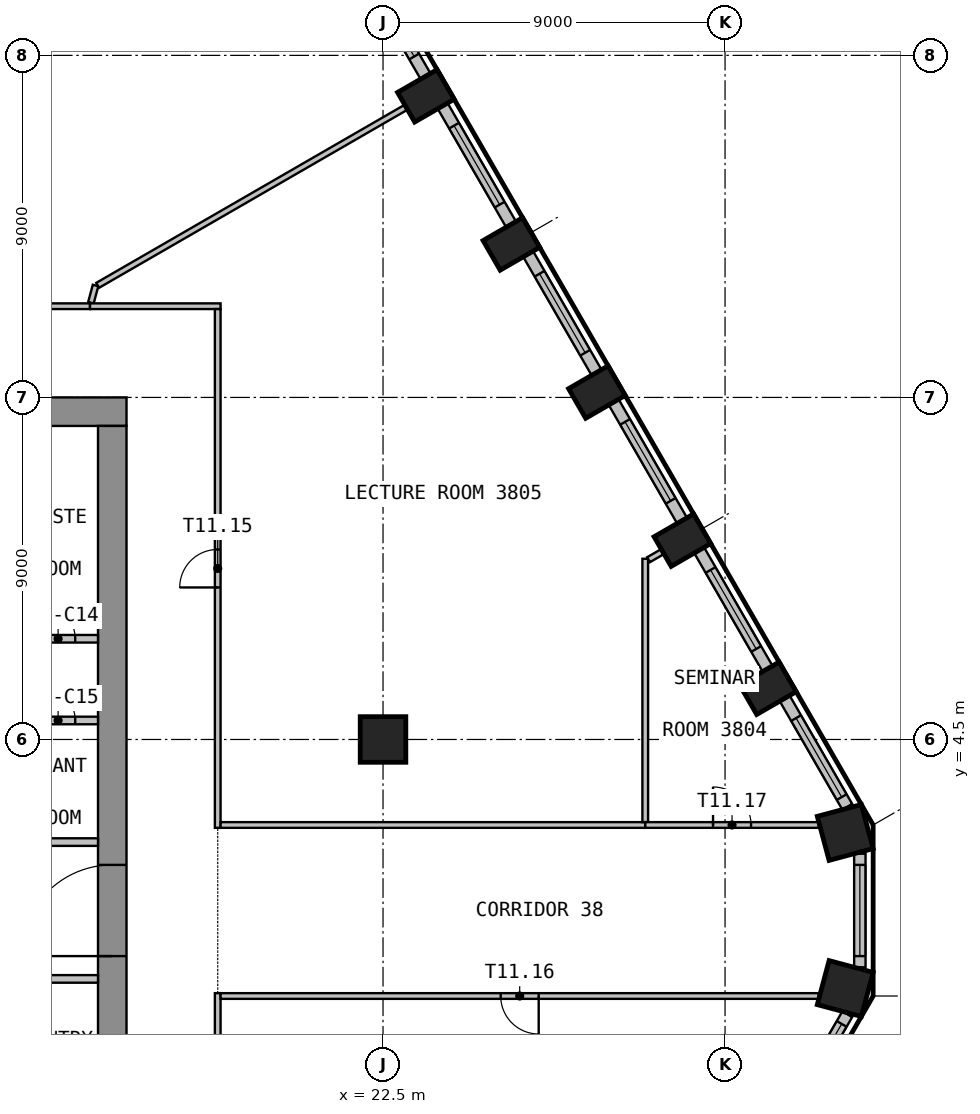
"""IFC4 building model, lengths in metres.
Left out: names, types, materials, properties, quantities, classifications, styles, units other than length and angle.
Written with IfcOpenShell. Run it as: python <this file> out.ifc"""

import sys

from ifc_helpers import new_model, si_unit, direction, frame, frame_2d, origin, origin_2d, place, context, subcontext, project, spatial, rectangle, circle, extrude, element, fill, save


model = new_model("IFC4")
c1 = context("Model", 3, precision=1e-05, world=origin(), true_north=direction((0.0, 1.0)))
c2 = subcontext(c1, "Body", "Model", "MODEL_VIEW")
j1 = project(units=[si_unit("LENGTHUNIT", "METRE"), si_unit("PLANEANGLEUNIT", "RADIAN")], contexts=[c1])
p1 = place(None, origin())
s1 = spatial("IfcSite", under=j1, at=p1, CompositionType="ELEMENT")
p2 = place(p1, origin())
s2 = spatial("IfcBuilding", under=s1, at=p2, CompositionType="ELEMENT")
p3 = place(p2, frame((0.0, 0.0, 156.0)))
s3 = spatial("IfcBuildingStorey", under=s2, at=p3, CompositionType="ELEMENT", Elevation=156.0)
for number, where, z_axis, x_axis in (
    (1, (34.662, -2.053, 0.0), (0.0, 0.0, 1.0), (0.259, 0.966, 0.0)),
    (2, (34.662, 2.053, 0.0), (0.0, 0.0, 1.0), (-0.259, 0.966, 0.0)),
):
    element("IfcColumn", number, at=place(p3, frame(where, z_axis=z_axis, x_axis=x_axis)), inside=s3, PredefinedType="COLUMN", context=c2, shape_type="SweptSolid", body=[
        extrude(rectangle(XDim=1.2, YDim=1.2, at=origin_2d()), origin(), (0.0, 0.0, 1.0), 3.575),
    ])
for number, where, z_axis, x_axis in (
    (3, (32.627, 5.847, 0.0), (0.0, 0.0, 1.0), (-0.5, 0.866, 0.0)),
    (4, (30.377, 9.744, 0.0), (0.0, 0.0, 1.0), (-0.5, 0.866, 0.0)),
    (5, (28.127, 13.641, 0.0), (0.0, 0.0, 1.0), (-0.5, 0.866, 0.0)),
    (6, (25.877, 17.539, 0.0), (0.0, 0.0, 1.0), (-0.5, 0.866, 0.0)),
    (7, (23.627, 21.436, 0.0), (0.0, 0.0, 1.0), (-0.5, 0.866, 0.0)),
):
    element("IfcColumn", number, at=place(p3, frame(where, z_axis=z_axis, x_axis=x_axis)), inside=s3, PredefinedType="COLUMN", context=c2, shape_type="SweptSolid", body=[
        extrude(rectangle(XDim=0.9, YDim=1.2, at=origin_2d()), origin(), (0.0, 0.0, 1.0), 3.575),
    ])
p4 = place(p3, frame((22.5, 4.5, 0.0), z_axis=(0.0, 0.0, 1.0), x_axis=(1.0, 0.0, 0.0)))
e8 = element("IfcColumn", 8, at=p4, inside=s3, PredefinedType="COLUMN", context=c2, shape_type="SweptSolid", body=[
    extrude(circle(Radius=0.6, at=origin_2d()), origin(), (0.0, 0.0, 1.0), 3.575),
])
p5 = place(p3, frame((33.069, -5.582, 0.0), z_axis=(0.0, 0.0, 1.0), x_axis=(0.499981217486, 0.866036247602, 0.0)))
e9 = element("IfcWall", 9, at=p5, inside=s3, PredefinedType="SOLIDWALL", context=c2, shape_type="SweptSolid", body=[
    extrude(rectangle(XDim=3.294, YDim=0.3, at=frame_2d((1.647, 0.0))), origin(), (0.0, 0.0, 1.0), 3.575),
])
p6 = place(p5, frame((0.6, 0.0, 0.9)))
e10 = element("IfcOpeningElement", 10, at=p6, cuts=e9, PredefinedType="OPENING", context=c2, shape_type="SweptSolid", body=[
    extrude(rectangle(XDim=2.4, YDim=2.1, at=frame_2d((1.2, 1.05))), frame((0.0, 0.16, 0.0), z_axis=(0.0, -1.0, 0.0), x_axis=(1.0, 0.0, 0.0)), (0.0, 0.0, 1.0), 0.32),
])
p7 = place(p3, frame((35.047, -1.495, 0.0), z_axis=(0.0, 0.0, 1.0), x_axis=(0.0, 1.0, 0.0)))
e11 = element("IfcWall", 11, at=p7, inside=s3, PredefinedType="SOLIDWALL", context=c2, shape_type="SweptSolid", body=[
    extrude(rectangle(XDim=2.989, YDim=0.3, at=frame_2d((1.495, 0.0))), origin(), (0.0, 0.0, 1.0), 3.575),
])
p8 = place(p7, frame((0.295, 0.0, 0.9)))
e12 = element("IfcOpeningElement", 12, at=p8, cuts=e11, PredefinedType="OPENING", context=c2, shape_type="SweptSolid", body=[
    extrude(rectangle(XDim=2.4, YDim=2.1, at=frame_2d((1.2, 1.05))), frame((0.0, 0.16, 0.0), z_axis=(0.0, -1.0, 0.0), x_axis=(1.0, 0.0, 0.0)), (0.0, 0.0, 1.0), 0.32),
])
p9 = place(p3, frame((34.716, 2.729, 0.0), z_axis=(0.0, 0.0, 1.0), x_axis=(-0.499981217486, 0.866036247602, 0.0)))
e13 = element("IfcWall", 13, at=p9, inside=s3, PredefinedType="SOLIDWALL", context=c2, shape_type="SweptSolid", body=[
    extrude(rectangle(XDim=3.294, YDim=0.3, at=frame_2d((1.647, 0.0))), origin(), (0.0, 0.0, 1.0), 3.575),
])
p10 = place(p9, frame((0.295, 0.0, 0.9)))
e14 = element("IfcOpeningElement", 14, at=p10, cuts=e13, PredefinedType="OPENING", context=c2, shape_type="SweptSolid", body=[
    extrude(rectangle(XDim=2.4, YDim=2.1, at=frame_2d((1.2, 1.05))), frame((0.0, 0.16, 0.0), z_axis=(0.0, -1.0, 0.0), x_axis=(1.0, 0.0, 0.0)), (0.0, 0.0, 1.0), 0.32),
])
p11 = place(p3, frame((32.619, 6.362, 0.0), z_axis=(0.0, 0.0, 1.0), x_axis=(-0.500027802648, 0.866009351323, 0.0)))
e15 = element("IfcWall", 15, at=p11, inside=s3, PredefinedType="SOLIDWALL", context=c2, shape_type="SweptSolid", body=[
    extrude(rectangle(XDim=3.599, YDim=0.3, at=frame_2d((1.799, 0.0))), origin(), (0.0, 0.0, 1.0), 3.575),
])
p12 = place(p11, frame((0.6, 0.0, 0.9)))
e16 = element("IfcOpeningElement", 16, at=p12, cuts=e15, PredefinedType="OPENING", context=c2, shape_type="SweptSolid", body=[
    extrude(rectangle(XDim=2.4, YDim=2.1, at=frame_2d((1.2, 1.05))), frame((0.0, 0.16, 0.0), z_axis=(0.0, -1.0, 0.0), x_axis=(1.0, 0.0, 0.0)), (0.0, 0.0, 1.0), 0.32),
])
p13 = place(p3, frame((30.369, 10.26, 0.0), z_axis=(0.0, 0.0, 1.0), x_axis=(-0.500027802648, 0.866009351323, 0.0)))
e17 = element("IfcWall", 17, at=p13, inside=s3, PredefinedType="SOLIDWALL", context=c2, shape_type="SweptSolid", body=[
    extrude(rectangle(XDim=3.599, YDim=0.3, at=frame_2d((1.799, 0.0))), origin(), (0.0, 0.0, 1.0), 3.575),
])
p14 = place(p13, frame((0.6, 0.0, 0.9)))
e18 = element("IfcOpeningElement", 18, at=p14, cuts=e17, PredefinedType="OPENING", context=c2, shape_type="SweptSolid", body=[
    extrude(rectangle(XDim=2.4, YDim=2.1, at=frame_2d((1.2, 1.05))), frame((0.0, 0.16, 0.0), z_axis=(0.0, -1.0, 0.0), x_axis=(1.0, 0.0, 0.0)), (0.0, 0.0, 1.0), 0.32),
])
p15 = place(p3, frame((28.119, 14.156, 0.0), z_axis=(0.0, 0.0, 1.0), x_axis=(-0.500027802648, 0.866009351323, 0.0)))
e19 = element("IfcWall", 19, at=p15, inside=s3, PredefinedType="SOLIDWALL", context=c2, shape_type="SweptSolid", body=[
    extrude(rectangle(XDim=3.599, YDim=0.3, at=frame_2d((1.799, 0.0))), origin(), (0.0, 0.0, 1.0), 3.575),
])
p16 = place(p15, frame((0.6, 0.0, 0.9)))
e20 = element("IfcOpeningElement", 20, at=p16, cuts=e19, PredefinedType="OPENING", context=c2, shape_type="SweptSolid", body=[
    extrude(rectangle(XDim=2.4, YDim=2.1, at=frame_2d((1.2, 1.05))), frame((0.0, 0.16, 0.0), z_axis=(0.0, -1.0, 0.0), x_axis=(1.0, 0.0, 0.0)), (0.0, 0.0, 1.0), 0.32),
])
p17 = place(p3, frame((25.869, 18.054, 0.0), z_axis=(0.0, 0.0, 1.0), x_axis=(-0.500027802648, 0.866009351323, 0.0)))
e21 = element("IfcWall", 21, at=p17, inside=s3, PredefinedType="SOLIDWALL", context=c2, shape_type="SweptSolid", body=[
    extrude(rectangle(XDim=3.599, YDim=0.3, at=frame_2d((1.799, 0.0))), origin(), (0.0, 0.0, 1.0), 3.575),
])
p18 = place(p17, frame((0.6, 0.0, 0.9)))
e22 = element("IfcOpeningElement", 22, at=p18, cuts=e21, PredefinedType="OPENING", context=c2, shape_type="SweptSolid", body=[
    extrude(rectangle(XDim=2.4, YDim=2.1, at=frame_2d((1.2, 1.05))), frame((0.0, 0.16, 0.0), z_axis=(0.0, -1.0, 0.0), x_axis=(1.0, 0.0, 0.0)), (0.0, 0.0, 1.0), 0.32),
])
p19 = place(p3, frame((23.619, 21.951, 0.0), z_axis=(0.0, 0.0, 1.0), x_axis=(-0.500036802197, 0.866004154983, 0.0)))
e23 = element("IfcWall", 23, at=p19, inside=s3, PredefinedType="SOLIDWALL", context=c2, shape_type="SweptSolid", body=[
    extrude(rectangle(XDim=3.294, YDim=0.3, at=frame_2d((1.647, 0.0))), origin(), (0.0, 0.0, 1.0), 3.575),
])
p20 = place(p19, frame((0.6, 0.0, 0.9)))
e24 = element("IfcOpeningElement", 24, at=p20, cuts=e23, PredefinedType="OPENING", context=c2, shape_type="SweptSolid", body=[
    extrude(rectangle(XDim=2.4, YDim=2.1, at=frame_2d((1.2, 1.05))), frame((0.0, 0.16, 0.0), z_axis=(0.0, -1.0, 0.0), x_axis=(1.0, 0.0, 0.0)), (0.0, 0.0, 1.0), 0.32),
])
p21 = place(p3, frame((-15.75, 13.125, 0.0), z_axis=(0.0, 0.0, 1.0), x_axis=(1.0, 0.0, 0.0)))
e25 = element("IfcWall", 25, at=p21, inside=s3, PredefinedType="SHEAR", context=c2, shape_type="SweptSolid", body=[
    extrude(rectangle(XDim=31.5, YDim=0.75, at=frame_2d((15.75, 0.0))), origin(), (0.0, 0.0, 1.0), 3.575),
])
p22 = place(p21, frame((14.55, 0.0, 0.0)))
e26 = element("IfcOpeningElement", 26, at=p22, cuts=e25, PredefinedType="OPENING", context=c2, shape_type="SweptSolid", body=[
    extrude(rectangle(XDim=2.4, YDim=2.1, at=frame_2d((1.2, 1.05))), frame((0.0, 0.385, 0.0), z_axis=(0.0, -1.0, 0.0), x_axis=(1.0, 0.0, 0.0)), (0.0, 0.0, 1.0), 0.77),
])
p23 = place(p21, frame((3.3, 0.0, 0.0)))
e27 = element("IfcOpeningElement", 27, at=p23, cuts=e25, PredefinedType="OPENING", context=c2, shape_type="SweptSolid", body=[
    extrude(rectangle(XDim=1.2, YDim=2.1, at=frame_2d((0.6, 1.05))), frame((0.0, 0.385, 0.0), z_axis=(0.0, -1.0, 0.0), x_axis=(1.0, 0.0, 0.0)), (0.0, 0.0, 1.0), 0.77),
])
p24 = place(p21, frame((27.0, 0.0, 0.0)))
e28 = element("IfcOpeningElement", 28, at=p24, cuts=e25, PredefinedType="OPENING", context=c2, shape_type="SweptSolid", body=[
    extrude(rectangle(XDim=1.2, YDim=2.1, at=frame_2d((0.6, 1.05))), frame((0.0, 0.385, 0.0), z_axis=(0.0, -1.0, 0.0), x_axis=(1.0, 0.0, 0.0)), (0.0, 0.0, 1.0), 0.77),
])
p25 = place(p3, frame((15.375, -12.75, 0.0), z_axis=(0.0, 0.0, 1.0), x_axis=(0.0, 1.0, 0.0)))
e29 = element("IfcWall", 29, at=p25, inside=s3, PredefinedType="SHEAR", context=c2, shape_type="SweptSolid", body=[
    extrude(rectangle(XDim=25.5, YDim=0.75, at=frame_2d((12.75, 0.0))), origin(), (0.0, 0.0, 1.0), 3.575),
])
p26 = place(p25, frame((11.55, 0.0, 0.0)))
e30 = element("IfcOpeningElement", 30, at=p26, cuts=e29, PredefinedType="OPENING", context=c2, shape_type="SweptSolid", body=[
    extrude(rectangle(XDim=2.4, YDim=2.1, at=frame_2d((1.2, 1.05))), frame((0.0, 0.385, 0.0), z_axis=(0.0, -1.0, 0.0), x_axis=(1.0, 0.0, 0.0)), (0.0, 0.0, 1.0), 0.77),
])
p27 = place(p3, frame((12.9, 7.15, 0.0), z_axis=(0.0, 0.0, 1.0), x_axis=(1.0, 0.0, 0.0)))
e31 = element("IfcWall", 31, at=p27, inside=s3, PredefinedType="PARTITIONING", context=c2, shape_type="SweptSolid", body=[
    extrude(rectangle(XDim=2.1, YDim=0.2, at=frame_2d((1.05, 0.0))), origin(), (0.0, 0.0, 1.0), 3.575),
])
p28 = place(p27, frame((0.6, 0.0, 0.0)))
e32 = element("IfcOpeningElement", 32, at=p28, cuts=e31, PredefinedType="OPENING", context=c2, shape_type="SweptSolid", body=[
    extrude(rectangle(XDim=0.9, YDim=2.1, at=frame_2d((0.45, 1.05))), frame((0.0, 0.11, 0.0), z_axis=(0.0, -1.0, 0.0), x_axis=(1.0, 0.0, 0.0)), (0.0, 0.0, 1.0), 0.22),
])
p29 = place(p3, frame((12.9, 5.0, 0.0), z_axis=(0.0, 0.0, 1.0), x_axis=(1.0, 0.0, 0.0)))
e33 = element("IfcWall", 33, at=p29, inside=s3, PredefinedType="PARTITIONING", context=c2, shape_type="SweptSolid", body=[
    extrude(rectangle(XDim=2.1, YDim=0.2, at=frame_2d((1.05, 0.0))), origin(), (0.0, 0.0, 1.0), 3.575),
])
p30 = place(p29, frame((0.6, 0.0, 0.0)))
e34 = element("IfcOpeningElement", 34, at=p30, cuts=e33, PredefinedType="OPENING", context=c2, shape_type="SweptSolid", body=[
    extrude(rectangle(XDim=0.9, YDim=2.1, at=frame_2d((0.45, 1.05))), frame((0.0, 0.11, 0.0), z_axis=(0.0, -1.0, 0.0), x_axis=(1.0, 0.0, 0.0)), (0.0, 0.0, 1.0), 0.22),
])
for number, where, z_axis, x_axis in (
    (35, (12.9, 1.8, 0.0), (0.0, 0.0, 1.0), (1.0, 0.0, 0.0)),
    (36, (12.9, -1.8, 0.0), (0.0, 0.0, 1.0), (1.0, 0.0, 0.0)),
):
    element("IfcWall", number, at=place(p3, frame(where, z_axis=z_axis, x_axis=x_axis)), inside=s3, PredefinedType="PARTITIONING", context=c2, shape_type="SweptSolid", body=[
        extrude(rectangle(XDim=2.1, YDim=0.2, at=frame_2d((1.05, 0.0))), origin(), (0.0, 0.0, 1.0), 3.575),
    ])
p31 = place(p3, frame((14.789, 15.9, 0.0), z_axis=(0.0, 0.0, 1.0), x_axis=(-1.0, 0.0, 0.0)))
e37 = element("IfcWall", 37, at=p31, inside=s3, PredefinedType="PARTITIONING", context=c2, shape_type="SweptSolid", body=[
    extrude(rectangle(XDim=5.789, YDim=0.15, at=frame_2d((2.895, 0.0))), origin(), (0.0, 0.0, 1.0), 3.575),
])
p32 = place(p31, frame((2.395, 0.0, 0.0)))
e38 = element("IfcOpeningElement", 38, at=p32, cuts=e37, PredefinedType="OPENING", context=c2, shape_type="SweptSolid", body=[
    extrude(rectangle(XDim=1.0, YDim=2.1, at=frame_2d((0.5, 1.05))), frame((0.0, 0.085, 0.0), z_axis=(0.0, -1.0, 0.0), x_axis=(1.0, 0.0, 0.0)), (0.0, 0.0, 1.0), 0.17),
])
p33 = place(p3, frame((14.935, 16.446, 0.0), z_axis=(0.0, 0.0, 1.0), x_axis=(-0.258147545917, -0.966105503833, 0.0)))
e39 = element("IfcWall", 39, at=p33, inside=s3, PredefinedType="PARTITIONING", context=c2, shape_type="SweptSolid", body=[
    extrude(rectangle(XDim=0.47, YDim=0.15, at=frame_2d((0.235, 0.0))), origin(), (0.0, 0.0, 1.0), 3.575),
])
p34 = place(p3, frame((18.225, 15.9, 0.0), z_axis=(0.0, 0.0, 1.0), x_axis=(-1.0, 0.0, 0.0)))
e40 = element("IfcWall", 40, at=p34, inside=s3, PredefinedType="PARTITIONING", context=c2, shape_type="SweptSolid", body=[
    extrude(rectangle(XDim=3.436, YDim=0.15, at=frame_2d((1.718, 0.0))), origin(), (0.0, 0.0, 1.0), 3.575),
])
p35 = place(p3, frame((23.09, 21.126, 0.0), z_axis=(0.0, 0.0, 1.0), x_axis=(-0.86600952399, -0.500027503603, 0.0)))
e41 = element("IfcWall", 41, at=p35, inside=s3, PredefinedType="PARTITIONING", context=c2, shape_type="SweptSolid", body=[
    extrude(rectangle(XDim=9.353, YDim=0.15, at=frame_2d((4.676, 0.0))), origin(), (0.0, 0.0, 1.0), 3.575),
])
p36 = place(p3, frame((18.15, -13.077, 0.0), z_axis=(0.0, 0.0, 1.0), x_axis=(0.0, 1.0, 0.0)))
e42 = element("IfcWall", 42, at=p36, inside=s3, PredefinedType="PARTITIONING", context=c2, shape_type="SweptSolid", body=[
    extrude(rectangle(XDim=10.902, YDim=0.15, at=frame_2d((5.451, 0.0))), origin(), (0.0, 0.0, 1.0), 3.575),
])
p37 = place(p3, frame((33.968, -2.25, 0.0), z_axis=(0.0, 0.0, 1.0), x_axis=(-1.0, 0.0, 0.0)))
e43 = element("IfcWall", 43, at=p37, inside=s3, PredefinedType="PARTITIONING", context=c2, shape_type="SweptSolid", body=[
    extrude(rectangle(XDim=15.743, YDim=0.15, at=frame_2d((7.871, 0.0))), origin(), (0.0, 0.0, 1.0), 3.575),
])
p38 = place(p37, frame((7.371, 0.0, 0.0)))
e44 = element("IfcOpeningElement", 44, at=p38, cuts=e43, PredefinedType="OPENING", context=c2, shape_type="SweptSolid", body=[
    extrude(rectangle(XDim=1.0, YDim=2.1, at=frame_2d((0.5, 1.05))), frame((0.0, 0.085, 0.0), z_axis=(0.0, -1.0, 0.0), x_axis=(1.0, 0.0, 0.0)), (0.0, 0.0, 1.0), 0.17),
])
p39 = place(p3, frame((18.15, 2.175, 0.0), z_axis=(0.0, 0.0, 1.0), x_axis=(0.0, 1.0, 0.0)))
e45 = element("IfcWall", 45, at=p39, inside=s3, PredefinedType="PARTITIONING", context=c2, shape_type="SweptSolid", body=[
    extrude(rectangle(XDim=13.65, YDim=0.15, at=frame_2d((6.825, 0.0))), origin(), (0.0, 0.0, 1.0), 3.575),
])
p40 = place(p39, frame((6.325, 0.0, 0.0)))
e46 = element("IfcOpeningElement", 46, at=p40, cuts=e45, PredefinedType="OPENING", context=c2, shape_type="SweptSolid", body=[
    extrude(rectangle(XDim=1.0, YDim=2.1, at=frame_2d((0.5, 1.05))), frame((0.0, 0.085, 0.0), z_axis=(0.0, -1.0, 0.0), x_axis=(1.0, 0.0, 0.0)), (0.0, 0.0, 1.0), 0.17),
])
p41 = place(p3, frame((18.225, 2.25, 0.0), z_axis=(0.0, 0.0, 1.0), x_axis=(1.0, 0.0, 0.0)))
e47 = element("IfcWall", 47, at=p41, inside=s3, PredefinedType="PARTITIONING", context=c2, shape_type="SweptSolid", body=[
    extrude(rectangle(XDim=11.175, YDim=0.15, at=frame_2d((5.587, 0.0))), origin(), (0.0, 0.0, 1.0), 3.575),
])
p42 = place(p3, frame((29.4, 9.255, 0.0), z_axis=(0.0, 0.0, 1.0), x_axis=(0.0, -1.0, 0.0)))
e48 = element("IfcWall", 48, at=p42, inside=s3, PredefinedType="MOVABLE", context=c2, shape_type="SweptSolid", body=[
    extrude(rectangle(XDim=6.93, YDim=0.15, at=frame_2d((3.465, 0.0))), origin(), (0.0, 0.0, 1.0), 3.575),
])
p43 = place(p3, frame((29.4, 2.25, 0.0), z_axis=(0.0, 0.0, 1.0), x_axis=(1.0, 0.0, 0.0)))
e49 = element("IfcWall", 49, at=p43, inside=s3, PredefinedType="PARTITIONING", context=c2, shape_type="SweptSolid", body=[
    extrude(rectangle(XDim=4.568, YDim=0.15, at=frame_2d((2.284, 0.0))), origin(), (0.0, 0.0, 1.0), 3.575),
])
p44 = place(p43, frame((1.784, 0.0, 0.0)))
e50 = element("IfcOpeningElement", 50, at=p44, cuts=e49, PredefinedType="OPENING", context=c2, shape_type="SweptSolid", body=[
    extrude(rectangle(XDim=1.0, YDim=2.1, at=frame_2d((0.5, 1.05))), frame((0.0, 0.085, 0.0), z_axis=(0.0, -1.0, 0.0), x_axis=(1.0, 0.0, 0.0)), (0.0, 0.0, 1.0), 0.17),
])
p45 = place(p3, frame((29.841, 9.434, 0.0), z_axis=(0.0, 0.0, 1.0), x_axis=(-0.865916841101, -0.500187988959, 0.0)))
e51 = element("IfcWall", 51, at=p45, inside=s3, PredefinedType="MOVABLE", context=c2, shape_type="SweptSolid", body=[
    extrude(rectangle(XDim=0.408, YDim=0.15, at=frame_2d((0.204, 0.0))), origin(), (0.0, 0.0, 1.0), 3.575),
])
p46 = place(p6, origin())
e52 = element("IfcWindow", 52, at=p46, inside=s3, PartitioningType="SINGLE_PANEL", PredefinedType="WINDOW", context=c2, shape_type="SweptSolid", body=[
    extrude(rectangle(XDim=2.4, YDim=2.1, at=frame_2d((1.2, 1.05))), frame((0.0, 0.03, 0.0), z_axis=(0.0, -1.0, 0.0), x_axis=(1.0, 0.0, 0.0)), (0.0, 0.0, 1.0), 0.06),
])
fill(e10, e52)
p47 = place(p8, origin())
e53 = element("IfcWindow", 53, at=p47, inside=s3, PartitioningType="SINGLE_PANEL", PredefinedType="WINDOW", context=c2, shape_type="SweptSolid", body=[
    extrude(rectangle(XDim=2.4, YDim=2.1, at=frame_2d((1.2, 1.05))), frame((0.0, 0.03, 0.0), z_axis=(0.0, -1.0, 0.0), x_axis=(1.0, 0.0, 0.0)), (0.0, 0.0, 1.0), 0.06),
])
fill(e12, e53)
p48 = place(p10, origin())
e54 = element("IfcWindow", 54, at=p48, inside=s3, PartitioningType="SINGLE_PANEL", PredefinedType="WINDOW", context=c2, shape_type="SweptSolid", body=[
    extrude(rectangle(XDim=2.4, YDim=2.1, at=frame_2d((1.2, 1.05))), frame((0.0, 0.03, 0.0), z_axis=(0.0, -1.0, 0.0), x_axis=(1.0, 0.0, 0.0)), (0.0, 0.0, 1.0), 0.06),
])
fill(e14, e54)
p49 = place(p12, origin())
e55 = element("IfcWindow", 55, at=p49, inside=s3, PartitioningType="SINGLE_PANEL", PredefinedType="WINDOW", context=c2, shape_type="SweptSolid", body=[
    extrude(rectangle(XDim=2.4, YDim=2.1, at=frame_2d((1.2, 1.05))), frame((0.0, 0.03, 0.0), z_axis=(0.0, -1.0, 0.0), x_axis=(1.0, 0.0, 0.0)), (0.0, 0.0, 1.0), 0.06),
])
fill(e16, e55)
p50 = place(p14, origin())
e56 = element("IfcWindow", 56, at=p50, inside=s3, PartitioningType="SINGLE_PANEL", PredefinedType="WINDOW", context=c2, shape_type="SweptSolid", body=[
    extrude(rectangle(XDim=2.4, YDim=2.1, at=frame_2d((1.2, 1.05))), frame((0.0, 0.03, 0.0), z_axis=(0.0, -1.0, 0.0), x_axis=(1.0, 0.0, 0.0)), (0.0, 0.0, 1.0), 0.06),
])
fill(e18, e56)
p51 = place(p16, origin())
e57 = element("IfcWindow", 57, at=p51, inside=s3, PartitioningType="SINGLE_PANEL", PredefinedType="WINDOW", context=c2, shape_type="SweptSolid", body=[
    extrude(rectangle(XDim=2.4, YDim=2.1, at=frame_2d((1.2, 1.05))), frame((0.0, 0.03, 0.0), z_axis=(0.0, -1.0, 0.0), x_axis=(1.0, 0.0, 0.0)), (0.0, 0.0, 1.0), 0.06),
])
fill(e20, e57)
p52 = place(p18, origin())
e58 = element("IfcWindow", 58, at=p52, inside=s3, PartitioningType="SINGLE_PANEL", PredefinedType="WINDOW", context=c2, shape_type="SweptSolid", body=[
    extrude(rectangle(XDim=2.4, YDim=2.1, at=frame_2d((1.2, 1.05))), frame((0.0, 0.03, 0.0), z_axis=(0.0, -1.0, 0.0), x_axis=(1.0, 0.0, 0.0)), (0.0, 0.0, 1.0), 0.06),
])
fill(e22, e58)
p53 = place(p20, origin())
e59 = element("IfcWindow", 59, at=p53, inside=s3, PartitioningType="SINGLE_PANEL", PredefinedType="WINDOW", context=c2, shape_type="SweptSolid", body=[
    extrude(rectangle(XDim=2.4, YDim=2.1, at=frame_2d((1.2, 1.05))), frame((0.0, 0.03, 0.0), z_axis=(0.0, -1.0, 0.0), x_axis=(1.0, 0.0, 0.0)), (0.0, 0.0, 1.0), 0.06),
])
fill(e24, e59)
p54 = place(p26, origin())
e60 = element("IfcDoor", 60, at=p54, inside=s3, OperationType="DOUBLE_DOOR_DOUBLE_SWING", PredefinedType="DOOR", context=c2, shape_type="SweptSolid", body=[
    extrude(rectangle(XDim=2.4, YDim=2.1, at=frame_2d((1.2, 1.05))), frame((0.0, 0.025, 0.0), z_axis=(0.0, -1.0, 0.0), x_axis=(1.0, 0.0, 0.0)), (0.0, 0.0, 1.0), 0.05),
])
fill(e30, e60)
p55 = place(p28, origin())
e61 = element("IfcDoor", 61, at=p55, inside=s3, OperationType="SINGLE_SWING_LEFT", PredefinedType="DOOR", context=c2, shape_type="SweptSolid", body=[
    extrude(rectangle(XDim=0.9, YDim=2.1, at=frame_2d((0.45, 1.05))), frame((0.0, 0.025, 0.0), z_axis=(0.0, -1.0, 0.0), x_axis=(1.0, 0.0, 0.0)), (0.0, 0.0, 1.0), 0.05),
])
fill(e32, e61)
p56 = place(p30, origin())
e62 = element("IfcDoor", 62, at=p56, inside=s3, OperationType="SINGLE_SWING_LEFT", PredefinedType="DOOR", context=c2, shape_type="SweptSolid", body=[
    extrude(rectangle(XDim=0.9, YDim=2.1, at=frame_2d((0.45, 1.05))), frame((0.0, 0.025, 0.0), z_axis=(0.0, -1.0, 0.0), x_axis=(1.0, 0.0, 0.0)), (0.0, 0.0, 1.0), 0.05),
])
fill(e34, e62)
p57 = place(p40, origin())
e63 = element("IfcDoor", 63, at=p57, inside=s3, OperationType="SINGLE_SWING_RIGHT", PredefinedType="DOOR", context=c2, shape_type="SweptSolid", body=[
    extrude(rectangle(XDim=1.0, YDim=2.1, at=frame_2d((0.5, 1.05))), frame((0.0, 0.025, 0.0), z_axis=(0.0, -1.0, 0.0), x_axis=(1.0, 0.0, 0.0)), (0.0, 0.0, 1.0), 0.05),
])
fill(e46, e63)
p58 = place(p38, origin())
e64 = element("IfcDoor", 64, at=p58, inside=s3, OperationType="SINGLE_SWING_RIGHT", PredefinedType="DOOR", context=c2, shape_type="SweptSolid", body=[
    extrude(rectangle(XDim=1.0, YDim=2.1, at=frame_2d((0.5, 1.05))), frame((0.0, 0.025, 0.0), z_axis=(0.0, -1.0, 0.0), x_axis=(1.0, 0.0, 0.0)), (0.0, 0.0, 1.0), 0.05),
])
fill(e44, e64)
p59 = place(p44, origin())
e65 = element("IfcDoor", 65, at=p59, inside=s3, OperationType="SINGLE_SWING_LEFT", PredefinedType="DOOR", context=c2, shape_type="SweptSolid", body=[
    extrude(rectangle(XDim=1.0, YDim=2.1, at=frame_2d((0.5, 1.05))), frame((0.0, 0.025, 0.0), z_axis=(0.0, -1.0, 0.0), x_axis=(1.0, 0.0, 0.0)), (0.0, 0.0, 1.0), 0.05),
])
fill(e50, e65)
save(model, sys.argv[1])
